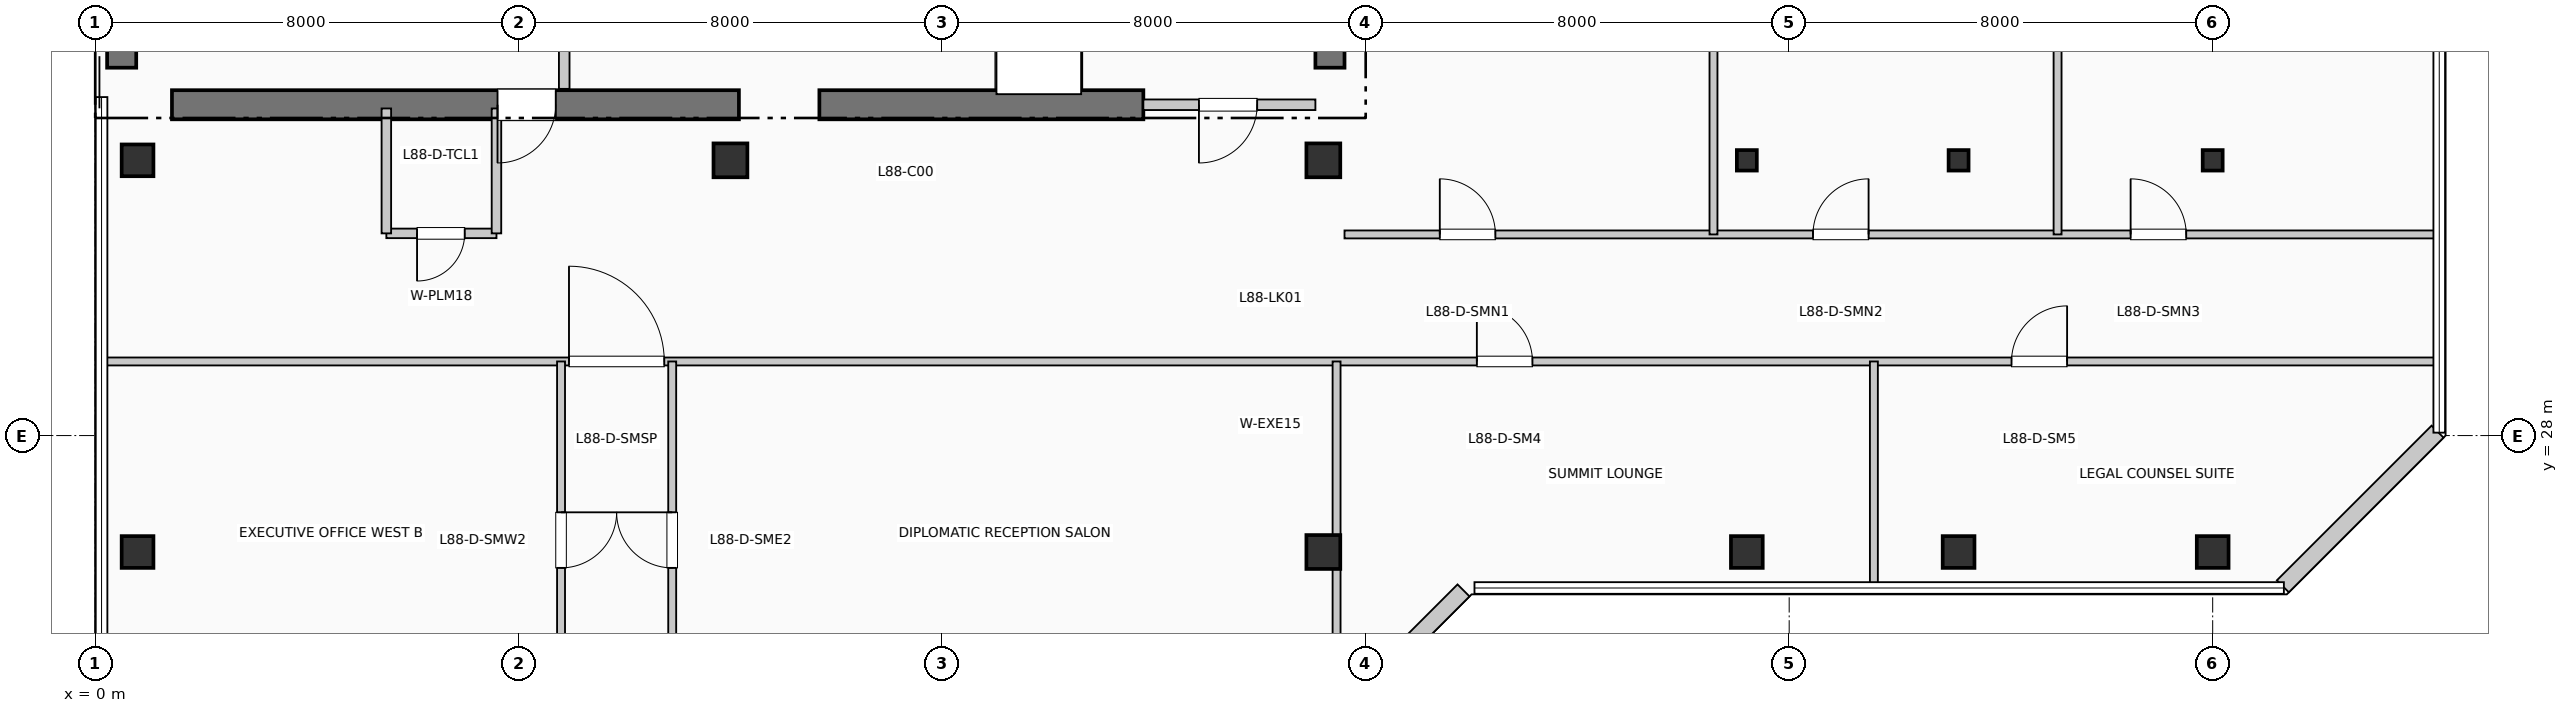
"""IFC4 building model, lengths in metres.
Left out: names, types, materials, properties, quantities, classifications, styles, units other than length and angle.
Written with IfcOpenShell. Run it as: python <this file> out.ifc"""

import sys

from ifc_helpers import new_model, si_unit, direction, frame, frame_2d, origin, origin_2d, place, context, subcontext, project, spatial, rectangle, i_section, extrude, element, fill, save


model = new_model("IFC4")
c1 = context("Model", 3, precision=1e-05, world=origin(), true_north=direction((0.0, 1.0)))
c2 = subcontext(c1, "Body", "Model", "MODEL_VIEW")
j1 = project(units=[si_unit("LENGTHUNIT", "METRE"), si_unit("PLANEANGLEUNIT", "RADIAN")], contexts=[c1])
p1 = place(None, origin())
s1 = spatial("IfcSite", under=j1, at=p1, CompositionType="ELEMENT")
p2 = place(p1, origin())
s2 = spatial("IfcBuilding", under=s1, at=p2, CompositionType="ELEMENT")
p3 = place(p2, frame((0.0, 0.0, 361.35)))
s3 = spatial("IfcBuildingStorey", under=s2, at=p3, CompositionType="ELEMENT", Elevation=361.35)
p4 = place(p3, frame((0.5, 34.95, 0.0), z_axis=(0.0, 0.0, 1.0), x_axis=(0.0, 1.0, 0.0)))
e1 = element("IfcWall", 1, at=p4, inside=s3, PredefinedType="SHEAR", context=c2, shape_type="SweptSolid", body=[
    extrude(rectangle(XDim=7.9, YDim=0.55, at=frame_2d((3.95, 0.0))), origin(), (0.0, 0.0, 1.0), 4.62),
])
p5 = place(p3, frame((23.325, 34.95, 0.0), z_axis=(0.0, 0.0, 1.0), x_axis=(0.0, 1.0, 0.0)))
e2 = element("IfcWall", 2, at=p5, inside=s3, PredefinedType="SHEAR", context=c2, shape_type="SweptSolid", body=[
    extrude(rectangle(XDim=10.64, YDim=0.55, at=frame_2d((5.32, 0.0))), origin(), (0.0, 0.0, 1.0), 4.62),
])
p6 = place(p3, frame((1.45, 34.25, 0.0), z_axis=(0.0, 0.0, 1.0), x_axis=(1.0, 0.0, 0.0)))
e3 = element("IfcWall", 3, at=p6, inside=s3, PredefinedType="SHEAR", context=c2, shape_type="SweptSolid", body=[
    extrude(rectangle(XDim=10.71, YDim=0.55, at=frame_2d((5.355, 0.0))), origin(), (0.0, 0.0, 1.0), 4.62),
])
p7 = place(p6, frame((7.25, 0.0, 0.0), z_axis=(0.0, 0.0, 1.0), x_axis=(-1.0, 0.0, 0.0)))
e4 = element("IfcOpeningElement", 4, at=p7, cuts=e3, PredefinedType="OPENING", context=c2, shape_type="SweptSolid", body=[
    extrude(rectangle(XDim=1.1, YDim=2.15, at=frame_2d((0.55, 1.075))), frame((0.0, 0.285, 0.0), z_axis=(0.0, -1.0, 0.0), x_axis=(1.0, 0.0, 0.0)), (0.0, 0.0, 1.0), 0.57),
])
p8 = place(p3, frame((13.68, 34.25, 0.0), z_axis=(0.0, 0.0, 1.0), x_axis=(1.0, 0.0, 0.0)))
e5 = element("IfcWall", 5, at=p8, inside=s3, PredefinedType="SHEAR", context=c2, shape_type="SweptSolid", body=[
    extrude(rectangle(XDim=6.12, YDim=0.55, at=frame_2d((3.06, 0.0))), origin(), (0.0, 0.0, 1.0), 4.62),
])
for number, where, z_axis, x_axis in (
    (6, (0.8, 25.8, 0.0), (0.0, 0.0, 1.0), (1.0, 0.0, 0.0)),
    (7, (0.8, 33.2, 0.0), (0.0, 0.0, 1.0), (1.0, 0.0, 0.0)),
):
    element("IfcColumn", number, at=place(p3, frame(where, z_axis=z_axis, x_axis=x_axis)), inside=s3, PredefinedType="COLUMN", context=c2, shape_type="SweptSolid", body=[
        extrude(rectangle(XDim=0.6, YDim=0.6, at=origin_2d()), origin(), (0.0, 0.0, 1.0), 4.62),
    ])
for number, where, z_axis, x_axis in (
    (8, (12.0, 33.2, 0.0), (0.0, 0.0, 1.0), (1.0, 0.0, 0.0)),
    (9, (23.2, 25.8, 0.0), (0.0, 0.0, 1.0), (1.0, 0.0, 0.0)),
    (10, (23.2, 33.2, 0.0), (0.0, 0.0, 1.0), (1.0, 0.0, 0.0)),
):
    element("IfcColumn", number, at=place(p3, frame(where, z_axis=z_axis, x_axis=x_axis)), inside=s3, PredefinedType="COLUMN", context=c2, shape_type="SweptSolid", body=[
        extrude(rectangle(XDim=0.64, YDim=0.64, at=origin_2d()), origin(), (0.0, 0.0, 1.0), 4.62),
    ])
p9 = place(p3, frame((31.2, 25.8, 0.0), z_axis=(0.0, 0.0, 1.0), x_axis=(1.0, 0.0, 0.0)))
e11 = element("IfcColumn", 11, at=p9, inside=s3, PredefinedType="COLUMN", context=c2, shape_type="SweptSolid", body=[
    extrude(rectangle(XDim=0.6, YDim=0.6, at=origin_2d()), origin(), (0.0, 0.0, 1.0), 4.62),
])
p10 = place(p3, frame((31.2, 33.2, 0.0), z_axis=(0.0, 0.0, 1.0), x_axis=(1.0, 0.0, 0.0)))
e12 = element("IfcColumn", 12, at=p10, inside=s3, PredefinedType="COLUMN", context=c2, shape_type="SweptSolid", body=[
    extrude(i_section(OverallWidth=0.377, OverallDepth=0.387, WebThickness=0.016, FlangeThickness=0.027, at=origin_2d()), origin(), (0.0, 0.0, 1.0), 4.62),
])
p11 = place(p3, frame((35.2, 25.8, 0.0), z_axis=(0.0, 0.0, 1.0), x_axis=(1.0, 0.0, 0.0)))
e13 = element("IfcColumn", 13, at=p11, inside=s3, PredefinedType="COLUMN", context=c2, shape_type="SweptSolid", body=[
    extrude(rectangle(XDim=0.6, YDim=0.6, at=origin_2d()), origin(), (0.0, 0.0, 1.0), 4.62),
])
p12 = place(p3, frame((35.2, 33.2, 0.0), z_axis=(0.0, 0.0, 1.0), x_axis=(1.0, 0.0, 0.0)))
e14 = element("IfcColumn", 14, at=p12, inside=s3, PredefinedType="COLUMN", context=c2, shape_type="SweptSolid", body=[
    extrude(i_section(OverallWidth=0.377, OverallDepth=0.387, WebThickness=0.016, FlangeThickness=0.027, at=origin_2d()), origin(), (0.0, 0.0, 1.0), 4.62),
])
p13 = place(p3, frame((40.0, 25.8, 0.0), z_axis=(0.0, 0.0, 1.0), x_axis=(1.0, 0.0, 0.0)))
e15 = element("IfcColumn", 15, at=p13, inside=s3, PredefinedType="COLUMN", context=c2, shape_type="SweptSolid", body=[
    extrude(rectangle(XDim=0.6, YDim=0.6, at=origin_2d()), origin(), (0.0, 0.0, 1.0), 4.62),
])
p14 = place(p3, frame((40.0, 33.2, 0.0), z_axis=(0.0, 0.0, 1.0), x_axis=(1.0, 0.0, 0.0)))
e16 = element("IfcColumn", 16, at=p14, inside=s3, PredefinedType="COLUMN", context=c2, shape_type="SweptSolid", body=[
    extrude(i_section(OverallWidth=0.377, OverallDepth=0.387, WebThickness=0.016, FlangeThickness=0.027, at=origin_2d()), origin(), (0.0, 0.0, 1.0), 4.62),
])
p15 = place(p3, frame((23.926, 23.152, 0.0), z_axis=(0.0, 0.0, 1.0), x_axis=(0.707106781187, 0.707106781187, 0.0)))
e17 = element("IfcWall", 17, at=p15, inside=s3, PredefinedType="SOLIDWALL", context=c2, shape_type="SweptSolid", body=[
    extrude(rectangle(XDim=2.718, YDim=0.32, at=frame_2d((1.359, 0.0))), origin(), (0.0, 0.0, 1.0), 4.27),
])
p16 = place(p3, frame((41.326, 25.152, 0.0), z_axis=(0.0, 0.0, 1.0), x_axis=(0.707136318428, 0.707077242712, 0.0)))
e18 = element("IfcWall", 18, at=p16, inside=s3, PredefinedType="SOLIDWALL", context=c2, shape_type="SweptSolid", body=[
    extrude(rectangle(XDim=4.133, YDim=0.32, at=frame_2d((2.066, 0.0))), origin(), (0.0, 0.0, 1.0), 4.27),
])
p17 = place(p3, frame((8.86, 34.55, 0.0), z_axis=(0.0, 0.0, 1.0), x_axis=(0.0, 1.0, 0.0)))
e19 = element("IfcWall", 19, at=p17, inside=s3, PredefinedType="PARTITIONING", context=c2, shape_type="SweptSolid", body=[
    extrude(rectangle(XDim=2.5, YDim=0.2, at=frame_2d((1.25, 0.0))), origin(), (0.0, 0.0, 1.0), 4.27),
])
p18 = place(p3, frame((19.8, 34.25, 0.0), z_axis=(0.0, 0.0, 1.0), x_axis=(1.0, 0.0, 0.0)))
e20 = element("IfcWall", 20, at=p18, inside=s3, PredefinedType="PARTITIONING", context=c2, shape_type="SweptSolid", body=[
    extrude(rectangle(XDim=3.25, YDim=0.2, at=frame_2d((1.625, 0.0))), origin(), (0.0, 0.0, 1.0), 4.27),
])
p19 = place(p18, frame((2.15, 0.0, 0.0), z_axis=(0.0, 0.0, 1.0), x_axis=(-1.0, 0.0, 0.0)))
e21 = element("IfcOpeningElement", 21, at=p19, cuts=e20, PredefinedType="OPENING", context=c2, shape_type="SweptSolid", body=[
    extrude(rectangle(XDim=1.1, YDim=2.15, at=frame_2d((0.55, 1.075))), frame((0.0, 0.11, 0.0), z_axis=(0.0, -1.0, 0.0), x_axis=(1.0, 0.0, 0.0)), (0.0, 0.0, 1.0), 0.22),
])
p20 = place(p3, frame((5.5, 31.82, 0.0), z_axis=(0.0, 0.0, 1.0), x_axis=(1.0, 0.0, 0.0)))
e22 = element("IfcWall", 22, at=p20, inside=s3, PredefinedType="PLUMBINGWALL", context=c2, shape_type="SweptSolid", body=[
    extrude(rectangle(XDim=2.08, YDim=0.18, at=frame_2d((1.04, 0.0))), origin(), (0.0, 0.0, 1.0), 4.27),
])
p21 = place(p20, frame((1.48, 0.0, 0.0), z_axis=(0.0, 0.0, 1.0), x_axis=(-1.0, 0.0, 0.0)))
e23 = element("IfcOpeningElement", 23, at=p21, cuts=e22, PredefinedType="OPENING", context=c2, shape_type="SweptSolid", body=[
    extrude(rectangle(XDim=0.9, YDim=2.1, at=frame_2d((0.45, 1.05))), frame((0.0, 0.1, 0.0), z_axis=(0.0, -1.0, 0.0), x_axis=(1.0, 0.0, 0.0)), (0.0, 0.0, 1.0), 0.2),
])
for number, where, z_axis, x_axis in (
    (24, (7.58, 31.82, 0.0), (0.0, 0.0, 1.0), (0.0, 1.0, 0.0)),
    (25, (5.5, 31.82, 0.0), (0.0, 0.0, 1.0), (0.0, 1.0, 0.0)),
):
    element("IfcWall", number, at=place(p3, frame(where, z_axis=z_axis, x_axis=x_axis)), inside=s3, PredefinedType="PLUMBINGWALL", context=c2, shape_type="SweptSolid", body=[
        extrude(rectangle(XDim=2.36, YDim=0.18, at=frame_2d((1.18, 0.0))), origin(), (0.0, 0.0, 1.0), 4.27),
    ])
p22 = place(p3, frame((0.19, 29.4, 0.0), z_axis=(0.0, 0.0, 1.0), x_axis=(1.0, 0.0, 0.0)))
e26 = element("IfcWall", 26, at=p22, inside=s3, PredefinedType="PARTITIONING", context=c2, shape_type="SweptSolid", body=[
    extrude(rectangle(XDim=44.02, YDim=0.15, at=frame_2d((22.01, 0.0))), origin(), (0.0, 0.0, 1.0), 3.955),
])
p23 = place(p22, frame((8.76, 0.0, 0.0)))
e27 = element("IfcOpeningElement", 27, at=p23, cuts=e26, PredefinedType="OPENING", context=c2, shape_type="SweptSolid", body=[
    extrude(rectangle(XDim=1.8, YDim=2.3, at=frame_2d((0.9, 1.15))), frame((0.0, 0.085, 0.0), z_axis=(0.0, -1.0, 0.0), x_axis=(1.0, 0.0, 0.0)), (0.0, 0.0, 1.0), 0.17),
])
p24 = place(p22, frame((25.91, 0.0, 0.0)))
e28 = element("IfcOpeningElement", 28, at=p24, cuts=e26, PredefinedType="OPENING", context=c2, shape_type="SweptSolid", body=[
    extrude(rectangle(XDim=1.05, YDim=2.15, at=frame_2d((0.525, 1.075))), frame((0.0, 0.085, 0.0), z_axis=(0.0, -1.0, 0.0), x_axis=(1.0, 0.0, 0.0)), (0.0, 0.0, 1.0), 0.17),
])
p25 = place(p22, frame((36.01, 0.0, 0.0)))
e29 = element("IfcOpeningElement", 29, at=p25, cuts=e26, PredefinedType="OPENING", context=c2, shape_type="SweptSolid", body=[
    extrude(rectangle(XDim=1.05, YDim=2.15, at=frame_2d((0.525, 1.075))), frame((0.0, 0.085, 0.0), z_axis=(0.0, -1.0, 0.0), x_axis=(1.0, 0.0, 0.0)), (0.0, 0.0, 1.0), 0.17),
])
p26 = place(p3, frame((23.6, 31.8, 0.0), z_axis=(0.0, 0.0, 1.0), x_axis=(1.0, 0.0, 0.0)))
e30 = element("IfcWall", 30, at=p26, inside=s3, PredefinedType="PARTITIONING", context=c2, shape_type="SweptSolid", body=[
    extrude(rectangle(XDim=20.61, YDim=0.15, at=frame_2d((10.305, 0.0))), origin(), (0.0, 0.0, 1.0), 4.27),
])
p27 = place(p26, frame((1.8, 0.0, 0.0)))
e31 = element("IfcOpeningElement", 31, at=p27, cuts=e30, PredefinedType="OPENING", context=c2, shape_type="SweptSolid", body=[
    extrude(rectangle(XDim=1.05, YDim=2.15, at=frame_2d((0.525, 1.075))), frame((0.0, 0.085, 0.0), z_axis=(0.0, -1.0, 0.0), x_axis=(1.0, 0.0, 0.0)), (0.0, 0.0, 1.0), 0.17),
])
p28 = place(p26, frame((8.85, 0.0, 0.0)))
e32 = element("IfcOpeningElement", 32, at=p28, cuts=e30, PredefinedType="OPENING", context=c2, shape_type="SweptSolid", body=[
    extrude(rectangle(XDim=1.05, YDim=2.15, at=frame_2d((0.525, 1.075))), frame((0.0, 0.085, 0.0), z_axis=(0.0, -1.0, 0.0), x_axis=(1.0, 0.0, 0.0)), (0.0, 0.0, 1.0), 0.17),
])
p29 = place(p26, frame((14.85, 0.0, 0.0)))
e33 = element("IfcOpeningElement", 33, at=p29, cuts=e30, PredefinedType="OPENING", context=c2, shape_type="SweptSolid", body=[
    extrude(rectangle(XDim=1.05, YDim=2.15, at=frame_2d((0.525, 1.075))), frame((0.0, 0.085, 0.0), z_axis=(0.0, -1.0, 0.0), x_axis=(1.0, 0.0, 0.0)), (0.0, 0.0, 1.0), 0.17),
])
p30 = place(p3, frame((8.8, 16.5, 0.0), z_axis=(0.0, 0.0, 1.0), x_axis=(0.0, 1.0, 0.0)))
e34 = element("IfcWall", 34, at=p30, inside=s3, PredefinedType="PARTITIONING", context=c2, shape_type="SweptSolid", body=[
    extrude(rectangle(XDim=12.9, YDim=0.15, at=frame_2d((6.45, 0.0))), origin(), (0.0, 0.0, 1.0), 4.27),
])
p31 = place(p30, frame((3.55, 0.0, 0.0), z_axis=(0.0, 0.0, 1.0), x_axis=(-1.0, 0.0, 0.0)))
e35 = element("IfcOpeningElement", 35, at=p31, cuts=e34, PredefinedType="OPENING", context=c2, shape_type="SweptSolid", body=[
    extrude(rectangle(XDim=1.05, YDim=2.15, at=frame_2d((0.525, 1.075))), frame((0.0, 0.085, 0.0), z_axis=(0.0, -1.0, 0.0), x_axis=(1.0, 0.0, 0.0)), (0.0, 0.0, 1.0), 0.17),
])
p32 = place(p30, frame((10.05, 0.0, 0.0), z_axis=(0.0, 0.0, 1.0), x_axis=(-1.0, 0.0, 0.0)))
e36 = element("IfcOpeningElement", 36, at=p32, cuts=e34, PredefinedType="OPENING", context=c2, shape_type="SweptSolid", body=[
    extrude(rectangle(XDim=1.05, YDim=2.15, at=frame_2d((0.525, 1.075))), frame((0.0, 0.085, 0.0), z_axis=(0.0, -1.0, 0.0), x_axis=(1.0, 0.0, 0.0)), (0.0, 0.0, 1.0), 0.17),
])
p33 = place(p3, frame((10.9, 16.5, 0.0), z_axis=(0.0, 0.0, 1.0), x_axis=(0.0, 1.0, 0.0)))
e37 = element("IfcWall", 37, at=p33, inside=s3, PredefinedType="PARTITIONING", context=c2, shape_type="SweptSolid", body=[
    extrude(rectangle(XDim=12.9, YDim=0.15, at=frame_2d((6.45, 0.0))), origin(), (0.0, 0.0, 1.0), 4.27),
])
p34 = place(p33, frame((3.5, 0.0, 0.0)))
e38 = element("IfcOpeningElement", 38, at=p34, cuts=e37, PredefinedType="OPENING", context=c2, shape_type="SweptSolid", body=[
    extrude(rectangle(XDim=1.05, YDim=2.15, at=frame_2d((0.525, 1.075))), frame((0.0, 0.085, 0.0), z_axis=(0.0, -1.0, 0.0), x_axis=(1.0, 0.0, 0.0)), (0.0, 0.0, 1.0), 0.17),
])
p35 = place(p33, frame((9.0, 0.0, 0.0)))
e39 = element("IfcOpeningElement", 39, at=p35, cuts=e37, PredefinedType="OPENING", context=c2, shape_type="SweptSolid", body=[
    extrude(rectangle(XDim=1.05, YDim=2.15, at=frame_2d((0.525, 1.075))), frame((0.0, 0.085, 0.0), z_axis=(0.0, -1.0, 0.0), x_axis=(1.0, 0.0, 0.0)), (0.0, 0.0, 1.0), 0.17),
])
p36 = place(p3, frame((23.45, 11.79, 0.0), z_axis=(0.0, 0.0, 1.0), x_axis=(0.0, 1.0, 0.0)))
e40 = element("IfcWall", 40, at=p36, inside=s3, PredefinedType="PARTITIONING", context=c2, shape_type="SweptSolid", body=[
    extrude(rectangle(XDim=17.61, YDim=0.15, at=frame_2d((8.805, 0.0))), origin(), (0.0, 0.0, 1.0), 3.755),
])
p37 = place(p3, frame((33.6, 25.19, 0.0), z_axis=(0.0, 0.0, 1.0), x_axis=(0.0, 1.0, 0.0)))
e41 = element("IfcWall", 41, at=p37, inside=s3, PredefinedType="PARTITIONING", context=c2, shape_type="SweptSolid", body=[
    extrude(rectangle(XDim=4.21, YDim=0.15, at=frame_2d((2.105, 0.0))), origin(), (0.0, 0.0, 1.0), 4.27),
])
for number, where, z_axis, x_axis in (
    (42, (30.57, 31.8, 0.0), (0.0, 0.0, 1.0), (0.0, 1.0, 0.0)),
    (43, (37.07, 31.8, 0.0), (0.0, 0.0, 1.0), (0.0, 1.0, 0.0)),
):
    element("IfcWall", number, at=place(p3, frame(where, z_axis=z_axis, x_axis=x_axis)), inside=s3, PredefinedType="PARTITIONING", context=c2, shape_type="SweptSolid", body=[
        extrude(rectangle(XDim=14.01, YDim=0.15, at=frame_2d((7.005, 0.0))), origin(), (0.0, 0.0, 1.0), 4.27),
    ])
p38 = place(p7, origin())
e44 = element("IfcDoor", 44, at=p38, inside=s3, OperationType="SINGLE_SWING_LEFT", PredefinedType="DOOR", context=c2, shape_type="SweptSolid", body=[
    extrude(rectangle(XDim=1.1, YDim=2.15, at=frame_2d((0.55, 1.075))), frame((0.0, 0.025, 0.0), z_axis=(0.0, -1.0, 0.0), x_axis=(1.0, 0.0, 0.0)), (0.0, 0.0, 1.0), 0.05),
])
fill(e4, e44)
p39 = place(p19, origin())
e45 = element("IfcDoor", 45, at=p39, inside=s3, OperationType="SINGLE_SWING_LEFT", PredefinedType="DOOR", context=c2, shape_type="SweptSolid", body=[
    extrude(rectangle(XDim=1.1, YDim=2.15, at=frame_2d((0.55, 1.075))), frame((0.0, 0.025, 0.0), z_axis=(0.0, -1.0, 0.0), x_axis=(1.0, 0.0, 0.0)), (0.0, 0.0, 1.0), 0.05),
])
fill(e21, e45)
p40 = place(p21, origin())
e46 = element("IfcDoor", 46, at=p40, inside=s3, OperationType="SINGLE_SWING_LEFT", PredefinedType="DOOR", context=c2, shape_type="SweptSolid", body=[
    extrude(rectangle(XDim=0.9, YDim=2.1, at=frame_2d((0.45, 1.05))), frame((0.0, 0.025, 0.0), z_axis=(0.0, -1.0, 0.0), x_axis=(1.0, 0.0, 0.0)), (0.0, 0.0, 1.0), 0.05),
])
fill(e23, e46)
p41 = place(p23, origin())
e47 = element("IfcDoor", 47, at=p41, inside=s3, OperationType="SINGLE_SWING_LEFT", PredefinedType="DOOR", context=c2, shape_type="SweptSolid", body=[
    extrude(rectangle(XDim=1.8, YDim=2.3, at=frame_2d((0.9, 1.15))), frame((0.0, 0.025, 0.0), z_axis=(0.0, -1.0, 0.0), x_axis=(1.0, 0.0, 0.0)), (0.0, 0.0, 1.0), 0.05),
])
fill(e27, e47)
p42 = place(p32, origin())
e48 = element("IfcDoor", 48, at=p42, inside=s3, OperationType="SINGLE_SWING_RIGHT", PredefinedType="DOOR", context=c2, shape_type="SweptSolid", body=[
    extrude(rectangle(XDim=1.05, YDim=2.15, at=frame_2d((0.525, 1.075))), frame((0.0, 0.025, 0.0), z_axis=(0.0, -1.0, 0.0), x_axis=(1.0, 0.0, 0.0)), (0.0, 0.0, 1.0), 0.05),
])
fill(e36, e48)
p43 = place(p35, origin())
e49 = element("IfcDoor", 49, at=p43, inside=s3, OperationType="SINGLE_SWING_RIGHT", PredefinedType="DOOR", context=c2, shape_type="SweptSolid", body=[
    extrude(rectangle(XDim=1.05, YDim=2.15, at=frame_2d((0.525, 1.075))), frame((0.0, 0.025, 0.0), z_axis=(0.0, -1.0, 0.0), x_axis=(1.0, 0.0, 0.0)), (0.0, 0.0, 1.0), 0.05),
])
fill(e39, e49)
p44 = place(p24, origin())
e50 = element("IfcDoor", 50, at=p44, inside=s3, OperationType="SINGLE_SWING_LEFT", PredefinedType="DOOR", context=c2, shape_type="SweptSolid", body=[
    extrude(rectangle(XDim=1.05, YDim=2.15, at=frame_2d((0.525, 1.075))), frame((0.0, 0.025, 0.0), z_axis=(0.0, -1.0, 0.0), x_axis=(1.0, 0.0, 0.0)), (0.0, 0.0, 1.0), 0.05),
])
fill(e28, e50)
p45 = place(p25, origin())
e51 = element("IfcDoor", 51, at=p45, inside=s3, OperationType="SINGLE_SWING_RIGHT", PredefinedType="DOOR", context=c2, shape_type="SweptSolid", body=[
    extrude(rectangle(XDim=1.05, YDim=2.15, at=frame_2d((0.525, 1.075))), frame((0.0, 0.025, 0.0), z_axis=(0.0, -1.0, 0.0), x_axis=(1.0, 0.0, 0.0)), (0.0, 0.0, 1.0), 0.05),
])
fill(e29, e51)
p46 = place(p27, origin())
e52 = element("IfcDoor", 52, at=p46, inside=s3, OperationType="SINGLE_SWING_LEFT", PredefinedType="DOOR", context=c2, shape_type="SweptSolid", body=[
    extrude(rectangle(XDim=1.05, YDim=2.15, at=frame_2d((0.525, 1.075))), frame((0.0, 0.025, 0.0), z_axis=(0.0, -1.0, 0.0), x_axis=(1.0, 0.0, 0.0)), (0.0, 0.0, 1.0), 0.05),
])
fill(e31, e52)
p47 = place(p28, origin())
e53 = element("IfcDoor", 53, at=p47, inside=s3, OperationType="SINGLE_SWING_RIGHT", PredefinedType="DOOR", context=c2, shape_type="SweptSolid", body=[
    extrude(rectangle(XDim=1.05, YDim=2.15, at=frame_2d((0.525, 1.075))), frame((0.0, 0.025, 0.0), z_axis=(0.0, -1.0, 0.0), x_axis=(1.0, 0.0, 0.0)), (0.0, 0.0, 1.0), 0.05),
])
fill(e32, e53)
p48 = place(p29, origin())
e54 = element("IfcDoor", 54, at=p48, inside=s3, OperationType="SINGLE_SWING_LEFT", PredefinedType="DOOR", context=c2, shape_type="SweptSolid", body=[
    extrude(rectangle(XDim=1.05, YDim=2.15, at=frame_2d((0.525, 1.075))), frame((0.0, 0.025, 0.0), z_axis=(0.0, -1.0, 0.0), x_axis=(1.0, 0.0, 0.0)), (0.0, 0.0, 1.0), 0.05),
])
fill(e33, e54)
save(model, sys.argv[1])
